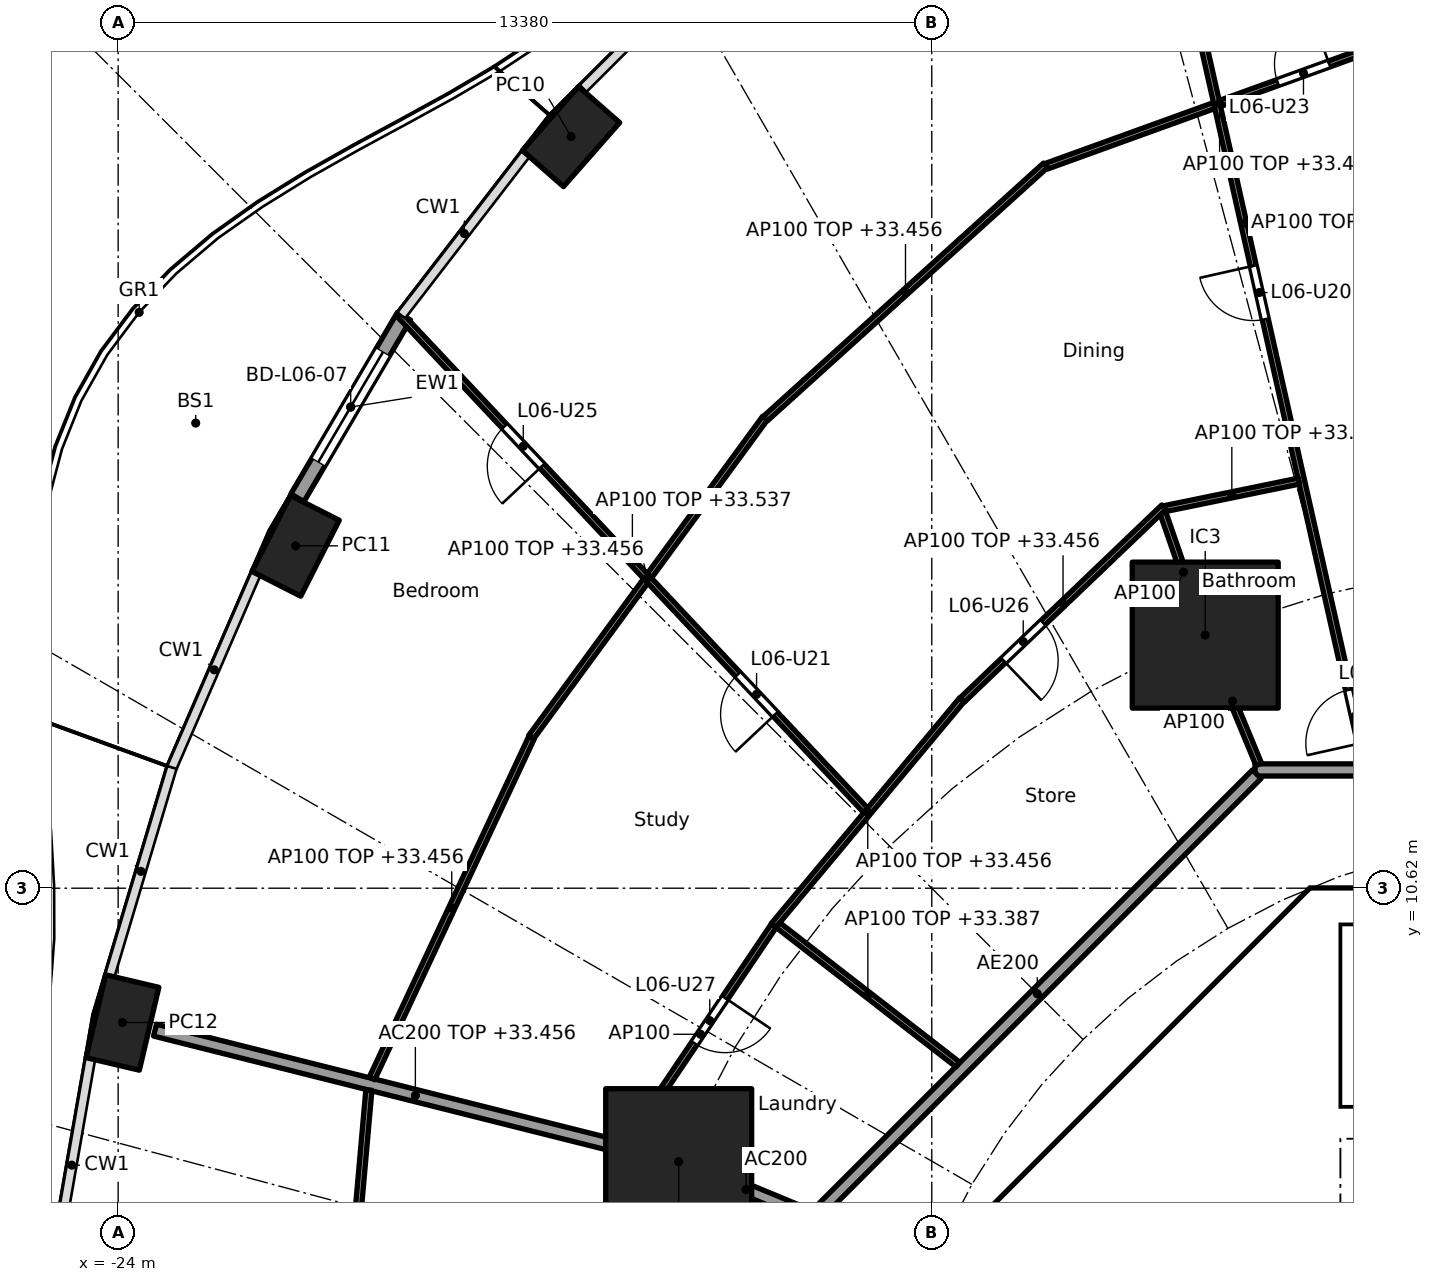
"""IFC4 building model, lengths in metres.
Left out: names, types, materials, properties, quantities, classifications, styles, units other than length and angle.
Written with IfcOpenShell. Run it as: python <this file> out.ifc"""

import sys

from ifc_helpers import new_model, si_unit, direction, frame, frame_2d, origin, origin_2d, place, context, subcontext, project, spatial, polyline, rectangle, hollow_rectangle, outline, extrude, element, fill, save


model = new_model("IFC4")
c1 = context("Model", 3, precision=1e-05, world=origin(), true_north=direction((0.0, 1.0)))
c2 = subcontext(c1, "Body", "Model", "MODEL_VIEW")
j1 = project(units=[si_unit("LENGTHUNIT", "METRE"), si_unit("PLANEANGLEUNIT", "RADIAN")], contexts=[c1])
p1 = place(None, origin())
s1 = spatial("IfcSite", under=j1, at=p1, CompositionType="ELEMENT")
p2 = place(p1, origin())
s2 = spatial("IfcBuilding", under=s1, at=p2, CompositionType="ELEMENT")
p3 = place(p2, frame((0.0, 0.0, 30.7)))
s3 = spatial("IfcBuildingStorey", under=s2, at=p3, CompositionType="ELEMENT", Elevation=30.7)
for number, where, z_axis, x_axis in (
    (1, (-16.552, 22.981, 0.0), (0.0, 0.0, 1.0), (-0.66, -0.751, 0.0)),
    (2, (-21.082, 16.25, 0.0), (0.0, 0.0, 1.0), (-0.452, -0.892, 0.0)),
    (3, (-23.929, 8.412, 0.0), (0.0, 0.0, 1.0), (-0.229, -0.973, 0.0)),
):
    element("IfcColumn", number, at=place(p3, frame(where, z_axis=z_axis, x_axis=x_axis)), inside=s3, PredefinedType="COLUMN", context=c2, shape_type="SweptSolid", body=[
        extrude(hollow_rectangle(XDim=1.4, YDim=0.9, WallThickness=0.05, at=origin_2d()), origin(), (0.0, 0.0, 1.0), 3.7),
    ])
for number, where, z_axis, x_axis in (
    (4, (-6.123, 14.782, 0.0), (0.0, 0.0, 1.0), (1.0, 0.0, 0.0)),
    (5, (-14.782, 6.123, 0.0), (0.0, 0.0, 1.0), (1.0, 0.0, 0.0)),
):
    element("IfcColumn", number, at=place(p3, frame(where, z_axis=z_axis, x_axis=x_axis)), inside=s3, PredefinedType="COLUMN", context=c2, shape_type="SweptSolid", body=[
        extrude(rectangle(XDim=2.4, YDim=2.4, at=origin_2d()), origin(), (0.0, 0.0, 1.0), 3.7),
    ])
p4 = place(p3, frame((-21.052, 17.04, 0.0), z_axis=(0.0, 0.0, 1.0), x_axis=(0.506311160839, 0.862350861546, 0.0)))
e6 = element("IfcWall", 6, at=p4, inside=s3, PredefinedType="SOLIDWALL", context=c2, shape_type="SweptSolid", body=[
    extrude(rectangle(XDim=3.462, YDim=0.25, at=frame_2d((1.731, 0.0))), origin(), (0.0, 0.0, 1.0), 3.44),
])
p5 = place(p4, frame((0.681, 0.0, 0.0)))
e7 = element("IfcOpeningElement", 7, at=p5, cuts=e6, PredefinedType="OPENING", context=c2, shape_type="SweptSolid", body=[
    extrude(rectangle(XDim=2.1, YDim=2.4, at=frame_2d((1.05, 1.2))), frame((0.0, 0.135, 0.0), z_axis=(0.0, -1.0, 0.0), x_axis=(1.0, 0.0, 0.0)), (0.0, 0.0, 1.0), 0.27),
])
p6 = place(p3, frame((-4.613, 9.988, 0.0), z_axis=(0.0, 0.0, 1.0), x_axis=(-0.707106781187, -0.707106781187, 0.0)))
e8 = element("IfcWall", 8, at=p6, inside=s3, PredefinedType="SHEAR", context=c2, shape_type="SweptSolid", body=[
    extrude(rectangle(XDim=7.602, YDim=0.6, at=frame_2d((3.801, 0.0))), origin(), (0.0, 0.0, 1.0), 3.44),
])
p7 = place(p6, frame((0.351, 0.0, 0.0)))
e9 = element("IfcOpeningElement", 9, at=p7, cuts=e8, PredefinedType="OPENING", context=c2, shape_type="SweptSolid", body=[
    extrude(rectangle(XDim=1.1, YDim=2.1, at=frame_2d((0.55, 1.05))), frame((0.0, 0.31, 0.0), z_axis=(0.0, -1.0, 0.0), x_axis=(1.0, 0.0, 0.0)), (0.0, 0.0, 1.0), 0.62),
])
p8 = place(p3, frame((-5.8, 4.3, 0.0), z_axis=(0.0, 0.0, 1.0), x_axis=(0.0, 1.0, 0.0)))
e10 = element("IfcWall", 10, at=p8, inside=s3, PredefinedType="PARTITIONING", context=c2, shape_type="SweptSolid", body=[
    extrude(rectangle(XDim=3.927, YDim=0.15, at=frame_2d((1.963, 0.0))), origin(), (0.0, 0.0, 1.0), 3.44),
])
p9 = place(p8, frame((0.413, 0.0, 0.0)))
e11 = element("IfcOpeningElement", 11, at=p9, cuts=e10, PredefinedType="OPENING", context=c2, shape_type="SweptSolid", body=[
    extrude(rectangle(XDim=0.9, YDim=2.1, at=frame_2d((0.45, 1.05))), frame((0.0, 0.085, 0.0), z_axis=(0.0, -1.0, 0.0), x_axis=(1.0, 0.0, 0.0)), (0.0, 0.0, 1.0), 0.17),
])
p10 = place(p8, frame((2.489, 0.0, 0.0)))
e12 = element("IfcOpeningElement", 12, at=p10, cuts=e10, PredefinedType="OPENING", context=c2, shape_type="SweptSolid", body=[
    extrude(rectangle(XDim=0.9, YDim=2.1, at=frame_2d((0.45, 1.05))), frame((0.0, 0.085, 0.0), z_axis=(0.0, -1.0, 0.0), x_axis=(1.0, 0.0, 0.0)), (0.0, 0.0, 1.0), 0.17),
])
p11 = place(p3, frame((-4.0, 4.3, 0.0), z_axis=(0.0, 0.0, 1.0), x_axis=(0.0, 1.0, 0.0)))
e13 = element("IfcWall", 13, at=p11, inside=s3, PredefinedType="SOLIDWALL", context=c2, shape_type="SweptSolid", body=[
    extrude(rectangle(XDim=2.2, YDim=0.2, at=frame_2d((1.1, 0.0))), origin(), (0.0, 0.0, 1.0), 3.44),
])
p12 = place(p11, frame((0.55, 0.0, 0.0)))
e14 = element("IfcOpeningElement", 14, at=p12, cuts=e13, PredefinedType="OPENING", context=c2, shape_type="SweptSolid", body=[
    extrude(rectangle(XDim=1.1, YDim=2.1, at=frame_2d((0.55, 1.05))), frame((0.0, 0.11, 0.0), z_axis=(0.0, -1.0, 0.0), x_axis=(1.0, 0.0, 0.0)), (0.0, 0.0, 1.0), 0.22),
])
p13 = place(p3, origin())
e15 = element("IfcWall", 15, at=p13, inside=s3, PredefinedType="SHEAR", context=c2, shape_type="SweptSolid", body=[
    extrude(outline(polyline([(-4.152, 10.025), (-4.401, 9.776), (-4.825, 10.2), (-4.401, 10.625), (4.401, 10.625), (4.825, 10.2), (4.401, 9.776), (4.152, 10.025), (-4.152, 10.025)])), origin(), (0.0, 0.0, 1.0), 3.44),
])
p14 = place(p3, frame((-8.001, 6.1, 0.0), z_axis=(0.0, 0.0, 1.0), x_axis=(1.0, 0.0, 0.0)))
e16 = element("IfcWall", 16, at=p14, inside=s3, PredefinedType="PARTITIONING", context=c2, shape_type="SweptSolid", body=[
    extrude(rectangle(XDim=2.126, YDim=0.15, at=frame_2d((1.063, 0.0))), origin(), (0.0, 0.0, 1.0), 3.44),
])
p15 = place(p3, origin())
e17 = element("IfcWall", 17, at=p15, inside=s3, PredefinedType="SOLIDWALL", context=c2, shape_type="SweptSolid", body=[
    extrude(outline(polyline([(-3.9, 7.025), (-4.1, 7.025), (-4.1, 10.025), (-3.9, 10.025), (-3.9, 7.025)])), origin(), (0.0, 0.0, 1.0), 3.44),
])
p16 = place(p3, origin())
e18 = element("IfcWall", 18, at=p16, inside=s3, PredefinedType="SOLIDWALL", context=c2, shape_type="SweptSolid", body=[
    extrude(outline(polyline([(4.1, 6.5), (-4.1, 6.5), (-4.1, 7.025), (4.1, 7.025), (4.1, 6.5)])), origin(), (0.0, 0.0, 1.0), 3.44),
])
p17 = place(p3, frame((-12.657, 5.243, 0.0), z_axis=(0.0, 0.0, 1.0), x_axis=(-0.923885664896, 0.382668627144, 0.0)))
e19 = element("IfcWall", 19, at=p17, inside=s3, PredefinedType="PARTITIONING", context=c2, shape_type="SweptSolid", body=[
    extrude(rectangle(XDim=2.2, YDim=0.2, at=frame_2d((1.1, 0.0))), origin(), (0.0, 0.0, 1.0), 3.44),
])
p18 = place(p3, frame((-14.831, 6.135, 0.0), z_axis=(0.0, 0.0, 1.0), x_axis=(-0.969884949569, 0.243563512454, 0.0)))
e20 = element("IfcWall", 20, at=p18, inside=s3, PredefinedType="PARTITIONING", context=c2, shape_type="SweptSolid", body=[
    extrude(rectangle(XDim=8.829, YDim=0.2, at=frame_2d((4.415, 0.0))), origin(), (0.0, 0.0, 1.0), 2.756),
])
p19 = place(p3, frame((5.104, 12.565, 0.0), z_axis=(0.0, 0.0, 1.0), x_axis=(-1.0, 0.0, 0.0)))
e21 = element("IfcWall", 21, at=p19, inside=s3, PredefinedType="PARTITIONING", context=c2, shape_type="SweptSolid", body=[
    extrude(rectangle(XDim=10.409, YDim=0.2, at=frame_2d((5.205, 0.0))), origin(), (0.0, 0.0, 1.0), 3.44),
])
p20 = place(p19, frame((6.339, 0.0, 0.0)))
e22 = element("IfcOpeningElement", 22, at=p20, cuts=e21, PredefinedType="OPENING", context=c2, shape_type="SweptSolid", body=[
    extrude(rectangle(XDim=1.0, YDim=2.1, at=frame_2d((0.5, 1.05))), frame((0.0, 0.11, 0.0), z_axis=(0.0, -1.0, 0.0), x_axis=(1.0, 0.0, 0.0)), (0.0, 0.0, 1.0), 0.22),
])
p21 = place(p3, frame((-5.275, 12.494, 0.0), z_axis=(0.0, 0.0, 1.0), x_axis=(-0.707106781187, -0.707106781187, 0.0)))
e23 = element("IfcWall", 23, at=p21, inside=s3, PredefinedType="PARTITIONING", context=c2, shape_type="SweptSolid", body=[
    extrude(rectangle(XDim=10.209, YDim=0.2, at=frame_2d((5.104, 0.0))), origin(), (0.0, 0.0, 1.0), 3.44),
])
p22 = place(p3, frame((-3.034, 24.554, 0.0), z_axis=(0.0, 0.0, 1.0), x_axis=(-0.940401691072, -0.340065669288, 0.0)))
e24 = element("IfcWall", 24, at=p22, inside=s3, PredefinedType="PARTITIONING", context=c2, shape_type="SweptSolid", body=[
    extrude(rectangle(XDim=6.067, YDim=0.1, at=frame_2d((3.034, 0.0))), origin(), (0.0, 0.0, 1.0), 2.756),
])
p23 = place(p22, frame((1.117, 0.0, 0.0)))
e25 = element("IfcOpeningElement", 25, at=p23, cuts=e24, PredefinedType="OPENING", context=c2, shape_type="SweptSolid", body=[
    extrude(rectangle(XDim=0.9, YDim=2.1, at=frame_2d((0.45, 1.05))), frame((0.0, 0.06, 0.0), z_axis=(0.0, -1.0, 0.0), x_axis=(1.0, 0.0, 0.0)), (0.0, 0.0, 1.0), 0.12),
])
p24 = place(p3, frame((-3.492, 12.662, 0.0), z_axis=(0.0, 0.0, 1.0), x_axis=(-0.219268088006, 0.975664648115, 0.0)))
e26 = element("IfcWall", 26, at=p24, inside=s3, PredefinedType="PARTITIONING", context=c2, shape_type="SweptSolid", body=[
    extrude(rectangle(XDim=18.23, YDim=0.1, at=frame_2d((9.115, 0.0))), origin(), (0.0, 0.0, 1.0), 2.687),
])
p25 = place(p24, frame((0.35, 0.0, 0.0)))
e27 = element("IfcOpeningElement", 27, at=p25, cuts=e26, PredefinedType="OPENING", context=c2, shape_type="SweptSolid", body=[
    extrude(rectangle(XDim=0.9, YDim=2.1, at=frame_2d((0.45, 1.05))), frame((0.0, 0.06, 0.0), z_axis=(0.0, -1.0, 0.0), x_axis=(1.0, 0.0, 0.0)), (0.0, 0.0, 1.0), 0.12),
])
p26 = place(p24, frame((7.497, 0.0, 0.0)))
e28 = element("IfcOpeningElement", 28, at=p26, cuts=e26, PredefinedType="OPENING", context=c2, shape_type="SweptSolid", body=[
    extrude(rectangle(XDim=0.9, YDim=2.1, at=frame_2d((0.45, 1.05))), frame((0.0, 0.06, 0.0), z_axis=(0.0, -1.0, 0.0), x_axis=(1.0, 0.0, 0.0)), (0.0, 0.0, 1.0), 0.12),
])
p27 = place(p24, frame((14.223, 0.0, 0.0)))
e29 = element("IfcOpeningElement", 29, at=p27, cuts=e26, PredefinedType="OPENING", context=c2, shape_type="SweptSolid", body=[
    extrude(rectangle(XDim=0.9, YDim=2.1, at=frame_2d((0.45, 1.05))), frame((0.0, 0.06, 0.0), z_axis=(0.0, -1.0, 0.0), x_axis=(1.0, 0.0, 0.0)), (0.0, 0.0, 1.0), 0.12),
])
p28 = place(p3, frame((-4.58, 17.315, 0.0), z_axis=(0.0, 0.0, 1.0), x_axis=(-0.979581941859, -0.201045316246, 0.0)))
e30 = element("IfcWall", 30, at=p28, inside=s3, PredefinedType="PARTITIONING", context=c2, shape_type="SweptSolid", body=[
    extrude(rectangle(XDim=2.256, YDim=0.1, at=frame_2d((1.128, 0.0))), origin(), (0.0, 0.0, 1.0), 2.756),
])
p29 = place(p3, frame((-5.243, 12.657, 0.0), z_axis=(0.0, 0.0, 1.0), x_axis=(-0.382719158442, 0.923864733477, 0.0)))
e31 = element("IfcWall", 31, at=p29, inside=s3, PredefinedType="PARTITIONING", context=c2, shape_type="SweptSolid", body=[
    extrude(rectangle(XDim=2.25, YDim=0.1, at=frame_2d((1.125, 0.0))), origin(), (0.0, 0.0, 1.0), 3.44),
])
p30 = place(p3, frame((-6.139, 14.83, 0.0), z_axis=(0.0, 0.0, 1.0), x_axis=(-0.327246993321, 0.944938836837, 0.0)))
e32 = element("IfcWall", 32, at=p30, inside=s3, PredefinedType="PARTITIONING", context=c2, shape_type="SweptSolid", body=[
    extrude(rectangle(XDim=2.09, YDim=0.1, at=frame_2d((1.045, 0.0))), origin(), (0.0, 0.0, 1.0), 3.44),
])
p31 = place(p3, frame((-6.803, 16.886, 0.0), z_axis=(0.0, 0.0, 1.0), x_axis=(-0.722763212502, -0.69109575216, 0.0)))
e33 = element("IfcWall", 33, at=p31, inside=s3, PredefinedType="PARTITIONING", context=c2, shape_type="SweptSolid", body=[
    extrude(rectangle(XDim=4.587, YDim=0.1, at=frame_2d((2.293, 0.0))), origin(), (0.0, 0.0, 1.0), 2.756),
])
p32 = place(p31, frame((2.75, 0.0, 0.0)))
e34 = element("IfcOpeningElement", 34, at=p32, cuts=e33, PredefinedType="OPENING", context=c2, shape_type="SweptSolid", body=[
    extrude(rectangle(XDim=0.9, YDim=2.1, at=frame_2d((0.45, 1.05))), frame((0.0, 0.06, 0.0), z_axis=(0.0, -1.0, 0.0), x_axis=(1.0, 0.0, 0.0)), (0.0, 0.0, 1.0), 0.12),
])
p33 = place(p3, frame((-8.749, 22.508, 0.0), z_axis=(0.0, 0.0, 1.0), x_axis=(-0.741720189244, -0.670709445936, 0.0)))
e35 = element("IfcWall", 35, at=p33, inside=s3, PredefinedType="PARTITIONING", context=c2, shape_type="SweptSolid", body=[
    extrude(rectangle(XDim=6.209, YDim=0.1, at=frame_2d((3.104, 0.0))), origin(), (0.0, 0.0, 1.0), 2.756),
])
p34 = place(p3, frame((-10.123, 13.72, 0.0), z_axis=(0.0, 0.0, 1.0), x_axis=(-0.64083455704, -0.767679015282, 0.0)))
e36 = element("IfcWall", 36, at=p34, inside=s3, PredefinedType="PARTITIONING", context=c2, shape_type="SweptSolid", body=[
    extrude(rectangle(XDim=4.837, YDim=0.1, at=frame_2d((2.418, 0.0))), origin(), (0.0, 0.0, 1.0), 2.756),
])
p35 = place(p3, frame((-13.362, 18.35, 0.0), z_axis=(0.0, 0.0, 1.0), x_axis=(-0.591191311491, -0.806531359104, 0.0)))
e37 = element("IfcWall", 37, at=p35, inside=s3, PredefinedType="PARTITIONING", context=c2, shape_type="SweptSolid", body=[
    extrude(rectangle(XDim=6.51, YDim=0.1, at=frame_2d((3.255, 0.0))), origin(), (0.0, 0.0, 1.0), 2.756),
])
p36 = place(p3, frame((-11.707, 11.9, 0.0), z_axis=(0.0, 0.0, 1.0), x_axis=(-0.685030806147, 0.728514100501, 0.0)))
e38 = element("IfcWall", 38, at=p36, inside=s3, PredefinedType="PARTITIONING", context=c2, shape_type="SweptSolid", body=[
    extrude(rectangle(XDim=11.201, YDim=0.1, at=frame_2d((5.601, 0.0))), origin(), (0.0, 0.0, 1.0), 2.837),
])
p37 = place(p36, frame((2.169, 0.0, 0.0)))
e39 = element("IfcOpeningElement", 39, at=p37, cuts=e38, PredefinedType="OPENING", context=c2, shape_type="SweptSolid", body=[
    extrude(rectangle(XDim=0.9, YDim=2.1, at=frame_2d((0.45, 1.05))), frame((0.0, 0.06, 0.0), z_axis=(0.0, -1.0, 0.0), x_axis=(1.0, 0.0, 0.0)), (0.0, 0.0, 1.0), 0.12),
])
p38 = place(p36, frame((7.77, 0.0, 0.0)))
e40 = element("IfcOpeningElement", 40, at=p38, cuts=e38, PredefinedType="OPENING", context=c2, shape_type="SweptSolid", body=[
    extrude(rectangle(XDim=0.9, YDim=2.1, at=frame_2d((0.45, 1.05))), frame((0.0, 0.06, 0.0), z_axis=(0.0, -1.0, 0.0), x_axis=(1.0, 0.0, 0.0)), (0.0, 0.0, 1.0), 0.12),
])
p39 = place(p3, frame((-10.19, 7.719, 0.0), z_axis=(0.0, 0.0, 1.0), x_axis=(-0.790253294643, 0.612780327937, 0.0)))
e41 = element("IfcWall", 41, at=p39, inside=s3, PredefinedType="PARTITIONING", context=c2, shape_type="SweptSolid", body=[
    extrude(rectangle(XDim=3.746, YDim=0.1, at=frame_2d((1.873, 0.0))), origin(), (0.0, 0.0, 1.0), 2.687),
])
p40 = place(p3, frame((-13.218, 10.004, 0.0), z_axis=(0.0, 0.0, 1.0), x_axis=(-0.559112679527, -0.829091678641, 0.0)))
e42 = element("IfcWall", 42, at=p40, inside=s3, PredefinedType="PARTITIONING", context=c2, shape_type="SweptSolid", body=[
    extrude(rectangle(XDim=4.308, YDim=0.1, at=frame_2d((2.154, 0.0))), origin(), (0.0, 0.0, 1.0), 3.44),
])
p41 = place(p40, frame((1.433, 0.0, 0.0)))
e43 = element("IfcOpeningElement", 43, at=p41, cuts=e42, PredefinedType="OPENING", context=c2, shape_type="SweptSolid", body=[
    extrude(rectangle(XDim=0.9, YDim=2.1, at=frame_2d((0.45, 1.05))), frame((0.0, 0.06, 0.0), z_axis=(0.0, -1.0, 0.0), x_axis=(1.0, 0.0, 0.0)), (0.0, 0.0, 1.0), 0.12),
])
p42 = place(p3, frame((-17.203, 13.095, 0.0), z_axis=(0.0, 0.0, 1.0), x_axis=(-0.423926333401, -0.905696673202, 0.0)))
e44 = element("IfcWall", 44, at=p42, inside=s3, PredefinedType="PARTITIONING", context=c2, shape_type="SweptSolid", body=[
    extrude(rectangle(XDim=6.188, YDim=0.1, at=frame_2d((3.094, 0.0))), origin(), (0.0, 0.0, 1.0), 2.756),
])
p43 = place(p3, frame((-15.688, 6.249, 0.0), z_axis=(0.0, 0.0, 1.0), x_axis=(-0.054659814056, -0.998505034903, 0.0)))
e45 = element("IfcWall", 45, at=p43, inside=s3, PredefinedType="PARTITIONING", context=c2, shape_type="SweptSolid", body=[
    extrude(rectangle(XDim=6.208, YDim=0.1, at=frame_2d((3.104, 0.0))), origin(), (0.0, 0.0, 1.0), 2.756),
])
p44 = place(p3, frame((-19.877, 7.301, 0.0), z_axis=(0.0, 0.0, 1.0), x_axis=(-0.088143415068, -0.996107794558, 0.0)))
e46 = element("IfcWall", 46, at=p44, inside=s3, PredefinedType="PARTITIONING", context=c2, shape_type="SweptSolid", body=[
    extrude(rectangle(XDim=7.279, YDim=0.1, at=frame_2d((3.64, 0.0))), origin(), (0.0, 0.0, 1.0), 2.756),
])
p45 = place(p5, origin())
e47 = element("IfcDoor", 47, at=p45, inside=s3, OperationType="SLIDING_TO_LEFT", PredefinedType="DOOR", context=c2, shape_type="SweptSolid", body=[
    extrude(rectangle(XDim=2.1, YDim=2.4, at=frame_2d((1.05, 1.2))), frame((0.0, 0.025, 0.0), z_axis=(0.0, -1.0, 0.0), x_axis=(1.0, 0.0, 0.0)), (0.0, 0.0, 1.0), 0.05),
])
fill(e7, e47)
p46 = place(p12, origin())
e48 = element("IfcDoor", 48, at=p46, inside=s3, OperationType="DOUBLE_DOOR_SLIDING", PredefinedType="DOOR", context=c2, shape_type="SweptSolid", body=[
    extrude(rectangle(XDim=1.1, YDim=2.1, at=frame_2d((0.55, 1.05))), frame((0.0, 0.025, 0.0), z_axis=(0.0, -1.0, 0.0), x_axis=(1.0, 0.0, 0.0)), (0.0, 0.0, 1.0), 0.05),
])
fill(e14, e48)
p47 = place(p9, origin())
e49 = element("IfcDoor", 49, at=p47, inside=s3, OperationType="SINGLE_SWING_LEFT", PredefinedType="DOOR", context=c2, shape_type="SweptSolid", body=[
    extrude(rectangle(XDim=0.9, YDim=2.1, at=frame_2d((0.45, 1.05))), frame((0.0, 0.025, 0.0), z_axis=(0.0, -1.0, 0.0), x_axis=(1.0, 0.0, 0.0)), (0.0, 0.0, 1.0), 0.05),
])
fill(e11, e49)
p48 = place(p10, origin())
e50 = element("IfcDoor", 50, at=p48, inside=s3, OperationType="SINGLE_SWING_LEFT", PredefinedType="DOOR", context=c2, shape_type="SweptSolid", body=[
    extrude(rectangle(XDim=0.9, YDim=2.1, at=frame_2d((0.45, 1.05))), frame((0.0, 0.025, 0.0), z_axis=(0.0, -1.0, 0.0), x_axis=(1.0, 0.0, 0.0)), (0.0, 0.0, 1.0), 0.05),
])
fill(e12, e50)
p49 = place(p7, origin())
e51 = element("IfcDoor", 51, at=p49, inside=s3, OperationType="SINGLE_SWING_RIGHT", PredefinedType="DOOR", context=c2, shape_type="SweptSolid", body=[
    extrude(rectangle(XDim=1.1, YDim=2.1, at=frame_2d((0.55, 1.05))), frame((0.0, 0.025, 0.0), z_axis=(0.0, -1.0, 0.0), x_axis=(1.0, 0.0, 0.0)), (0.0, 0.0, 1.0), 0.05),
])
fill(e9, e51)
p50 = place(p25, origin())
e52 = element("IfcDoor", 52, at=p50, inside=s3, OperationType="SINGLE_SWING_LEFT", PredefinedType="DOOR", context=c2, shape_type="SweptSolid", body=[
    extrude(rectangle(XDim=0.9, YDim=2.1, at=frame_2d((0.45, 1.05))), frame((0.0, 0.025, 0.0), z_axis=(0.0, -1.0, 0.0), x_axis=(1.0, 0.0, 0.0)), (0.0, 0.0, 1.0), 0.05),
])
fill(e27, e52)
p51 = place(p26, origin())
e53 = element("IfcDoor", 53, at=p51, inside=s3, OperationType="SINGLE_SWING_RIGHT", PredefinedType="DOOR", context=c2, shape_type="SweptSolid", body=[
    extrude(rectangle(XDim=0.9, YDim=2.1, at=frame_2d((0.45, 1.05))), frame((0.0, 0.025, 0.0), z_axis=(0.0, -1.0, 0.0), x_axis=(1.0, 0.0, 0.0)), (0.0, 0.0, 1.0), 0.05),
])
fill(e28, e53)
p52 = place(p37, origin())
e54 = element("IfcDoor", 54, at=p52, inside=s3, OperationType="SINGLE_SWING_LEFT", PredefinedType="DOOR", context=c2, shape_type="SweptSolid", body=[
    extrude(rectangle(XDim=0.9, YDim=2.1, at=frame_2d((0.45, 1.05))), frame((0.0, 0.025, 0.0), z_axis=(0.0, -1.0, 0.0), x_axis=(1.0, 0.0, 0.0)), (0.0, 0.0, 1.0), 0.05),
])
fill(e39, e54)
p53 = place(p23, frame((0.9, 0.0, 0.0), x_axis=(-1.0, 0.0, 0.0)))
e55 = element("IfcDoor", 55, at=p53, inside=s3, OperationType="SINGLE_SWING_RIGHT", PredefinedType="DOOR", context=c2, shape_type="SweptSolid", body=[
    extrude(rectangle(XDim=0.9, YDim=2.1, at=frame_2d((0.45, 1.05))), frame((0.0, 0.025, 0.0), z_axis=(0.0, -1.0, 0.0), x_axis=(1.0, 0.0, 0.0)), (0.0, 0.0, 1.0), 0.05),
])
fill(e25, e55)
p54 = place(p38, origin())
e56 = element("IfcDoor", 56, at=p54, inside=s3, OperationType="SINGLE_SWING_LEFT", PredefinedType="DOOR", context=c2, shape_type="SweptSolid", body=[
    extrude(rectangle(XDim=0.9, YDim=2.1, at=frame_2d((0.45, 1.05))), frame((0.0, 0.025, 0.0), z_axis=(0.0, -1.0, 0.0), x_axis=(1.0, 0.0, 0.0)), (0.0, 0.0, 1.0), 0.05),
])
fill(e40, e56)
p55 = place(p32, origin())
e57 = element("IfcDoor", 57, at=p55, inside=s3, OperationType="SINGLE_SWING_RIGHT", PredefinedType="DOOR", context=c2, shape_type="SweptSolid", body=[
    extrude(rectangle(XDim=0.9, YDim=2.1, at=frame_2d((0.45, 1.05))), frame((0.0, 0.025, 0.0), z_axis=(0.0, -1.0, 0.0), x_axis=(1.0, 0.0, 0.0)), (0.0, 0.0, 1.0), 0.05),
])
fill(e34, e57)
p56 = place(p41, origin())
e58 = element("IfcDoor", 58, at=p56, inside=s3, OperationType="SINGLE_SWING_LEFT", PredefinedType="DOOR", context=c2, shape_type="SweptSolid", body=[
    extrude(rectangle(XDim=0.9, YDim=2.1, at=frame_2d((0.45, 1.05))), frame((0.0, 0.025, 0.0), z_axis=(0.0, -1.0, 0.0), x_axis=(1.0, 0.0, 0.0)), (0.0, 0.0, 1.0), 0.05),
])
fill(e43, e58)
save(model, sys.argv[1])
